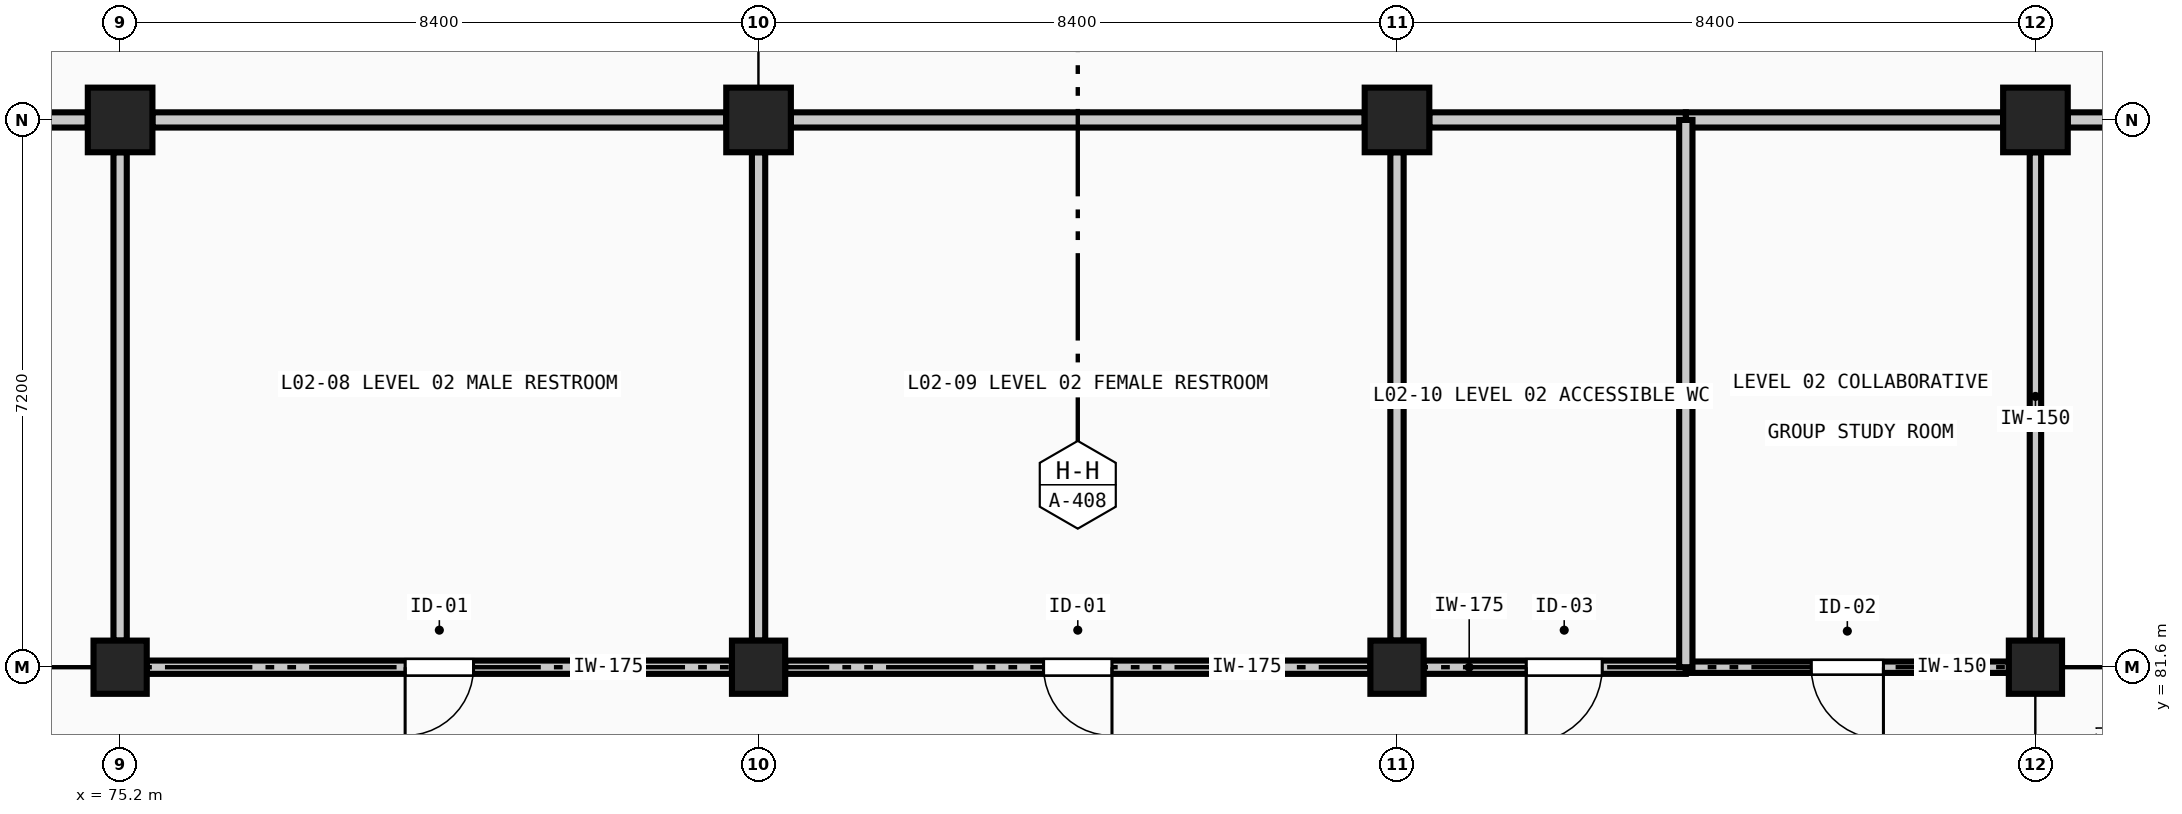
"""IFC4 building model, lengths in metres.
Left out: names, types, materials, properties, quantities, classifications, styles, units other than length and angle.
Written with IfcOpenShell. Run it as: python <this file> out.ifc"""

import sys

from ifc_helpers import new_model, si_unit, direction, frame, frame_2d, origin, origin_2d, place, context, subcontext, project, spatial, rectangle, extrude, element, fill, save


model = new_model("IFC4")
c1 = context("Model", 3, precision=1e-05, world=origin(), true_north=direction((0.0, 1.0)))
c2 = subcontext(c1, "Body", "Model", "MODEL_VIEW")
j1 = project(units=[si_unit("LENGTHUNIT", "METRE"), si_unit("PLANEANGLEUNIT", "RADIAN")], contexts=[c1])
p1 = place(None, origin())
s1 = spatial("IfcSite", under=j1, at=p1, CompositionType="ELEMENT")
p2 = place(p1, origin())
s2 = spatial("IfcBuilding", under=s1, at=p2, CompositionType="ELEMENT")
p3 = place(p2, frame((0.0, 0.0, 9.6)))
s3 = spatial("IfcBuildingStorey", under=s2, at=p3, CompositionType="ELEMENT", Elevation=9.6)
p4 = place(p3, frame((75.2, 81.6, 0.0), z_axis=(0.0, 0.0, 1.0), x_axis=(1.0, 0.0, 0.0)))
e1 = element("IfcColumn", 1, at=p4, inside=s3, PredefinedType="COLUMN", context=c2, shape_type="SweptSolid", body=[
    extrude(rectangle(XDim=0.7, YDim=0.7, at=origin_2d()), origin(), (0.0, 0.0, 1.0), 4.8),
])
p5 = place(p3, frame((75.2, 88.8, 0.0), z_axis=(0.0, 0.0, 1.0), x_axis=(1.0, 0.0, 0.0)))
e2 = element("IfcColumn", 2, at=p5, inside=s3, PredefinedType="COLUMN", context=c2, shape_type="SweptSolid", body=[
    extrude(rectangle(XDim=0.85, YDim=0.85, at=origin_2d()), origin(), (0.0, 0.0, 1.0), 4.8),
])
p6 = place(p3, frame((83.6, 81.6, 0.0), z_axis=(0.0, 0.0, 1.0), x_axis=(1.0, 0.0, 0.0)))
e3 = element("IfcColumn", 3, at=p6, inside=s3, PredefinedType="COLUMN", context=c2, shape_type="SweptSolid", body=[
    extrude(rectangle(XDim=0.7, YDim=0.7, at=origin_2d()), origin(), (0.0, 0.0, 1.0), 4.8),
])
p7 = place(p3, frame((83.6, 88.8, 0.0), z_axis=(0.0, 0.0, 1.0), x_axis=(1.0, 0.0, 0.0)))
e4 = element("IfcColumn", 4, at=p7, inside=s3, PredefinedType="COLUMN", context=c2, shape_type="SweptSolid", body=[
    extrude(rectangle(XDim=0.85, YDim=0.85, at=origin_2d()), origin(), (0.0, 0.0, 1.0), 4.8),
])
p8 = place(p3, frame((92.0, 81.6, 0.0), z_axis=(0.0, 0.0, 1.0), x_axis=(1.0, 0.0, 0.0)))
e5 = element("IfcColumn", 5, at=p8, inside=s3, PredefinedType="COLUMN", context=c2, shape_type="SweptSolid", body=[
    extrude(rectangle(XDim=0.7, YDim=0.7, at=origin_2d()), origin(), (0.0, 0.0, 1.0), 4.8),
])
p9 = place(p3, frame((92.0, 88.8, 0.0), z_axis=(0.0, 0.0, 1.0), x_axis=(1.0, 0.0, 0.0)))
e6 = element("IfcColumn", 6, at=p9, inside=s3, PredefinedType="COLUMN", context=c2, shape_type="SweptSolid", body=[
    extrude(rectangle(XDim=0.85, YDim=0.85, at=origin_2d()), origin(), (0.0, 0.0, 1.0), 4.8),
])
p10 = place(p3, frame((100.4, 81.6, 0.0), z_axis=(0.0, 0.0, 1.0), x_axis=(1.0, 0.0, 0.0)))
e7 = element("IfcColumn", 7, at=p10, inside=s3, PredefinedType="COLUMN", context=c2, shape_type="SweptSolid", body=[
    extrude(rectangle(XDim=0.7, YDim=0.7, at=origin_2d()), origin(), (0.0, 0.0, 1.0), 4.8),
])
p11 = place(p3, frame((100.4, 88.8, 0.0), z_axis=(0.0, 0.0, 1.0), x_axis=(1.0, 0.0, 0.0)))
e8 = element("IfcColumn", 8, at=p11, inside=s3, PredefinedType="COLUMN", context=c2, shape_type="SweptSolid", body=[
    extrude(rectangle(XDim=0.85, YDim=0.85, at=origin_2d()), origin(), (0.0, 0.0, 1.0), 4.8),
])
p12 = place(p3, frame((83.25, 81.6, 0.0), z_axis=(0.0, 0.0, 1.0), x_axis=(-1.0, 0.0, 0.0)))
e9 = element("IfcWall", 9, at=p12, inside=s3, PredefinedType="PLUMBINGWALL", context=c2, shape_type="SweptSolid", body=[
    extrude(rectangle(XDim=7.7, YDim=0.175, at=frame_2d((3.85, 0.0))), origin(), (0.0, 0.0, 1.0), 4.0),
])
p13 = place(p12, frame((3.4, 0.0, 0.0)))
e10 = element("IfcOpeningElement", 10, at=p13, cuts=e9, PredefinedType="OPENING", context=c2, shape_type="SweptSolid", body=[
    extrude(rectangle(XDim=0.9, YDim=2.1, at=frame_2d((0.45, 1.05))), frame((0.0, 0.097, 0.0), z_axis=(0.0, -1.0, 0.0), x_axis=(1.0, 0.0, 0.0)), (0.0, 0.0, 1.0), 0.195),
])
p14 = place(p3, frame((91.65, 81.6, 0.0), z_axis=(0.0, 0.0, 1.0), x_axis=(-1.0, 0.0, 0.0)))
e11 = element("IfcWall", 11, at=p14, inside=s3, PredefinedType="PLUMBINGWALL", context=c2, shape_type="SweptSolid", body=[
    extrude(rectangle(XDim=7.7, YDim=0.175, at=frame_2d((3.85, 0.0))), origin(), (0.0, 0.0, 1.0), 4.0),
])
p15 = place(p14, frame((3.4, 0.0, 0.0)))
e12 = element("IfcOpeningElement", 12, at=p15, cuts=e11, PredefinedType="OPENING", context=c2, shape_type="SweptSolid", body=[
    extrude(rectangle(XDim=0.9, YDim=2.1, at=frame_2d((0.45, 1.05))), frame((0.0, 0.097, 0.0), z_axis=(0.0, -1.0, 0.0), x_axis=(1.0, 0.0, 0.0)), (0.0, 0.0, 1.0), 0.195),
])
p16 = place(p3, frame((95.8, 81.6, 0.0), z_axis=(0.0, 0.0, 1.0), x_axis=(-1.0, 0.0, 0.0)))
e13 = element("IfcWall", 13, at=p16, inside=s3, PredefinedType="PLUMBINGWALL", context=c2, shape_type="SweptSolid", body=[
    extrude(rectangle(XDim=3.45, YDim=0.175, at=frame_2d((1.725, 0.0))), origin(), (0.0, 0.0, 1.0), 4.0),
])
p17 = place(p16, frame((1.1, 0.0, 0.0)))
e14 = element("IfcOpeningElement", 14, at=p17, cuts=e13, PredefinedType="OPENING", context=c2, shape_type="SweptSolid", body=[
    extrude(rectangle(XDim=1.0, YDim=2.15, at=frame_2d((0.5, 1.075))), frame((0.0, 0.097, 0.0), z_axis=(0.0, -1.0, 0.0), x_axis=(1.0, 0.0, 0.0)), (0.0, 0.0, 1.0), 0.195),
])
p18 = place(p3, frame((100.05, 81.6, 0.0), z_axis=(0.0, 0.0, 1.0), x_axis=(-1.0, 0.0, 0.0)))
e15 = element("IfcWall", 15, at=p18, inside=s3, PredefinedType="PARTITIONING", context=c2, shape_type="SweptSolid", body=[
    extrude(rectangle(XDim=4.25, YDim=0.15, at=frame_2d((2.125, 0.0))), origin(), (0.0, 0.0, 1.0), 4.0),
])
p19 = place(p18, frame((1.65, 0.0, 0.0)))
e16 = element("IfcOpeningElement", 16, at=p19, cuts=e15, PredefinedType="OPENING", context=c2, shape_type="SweptSolid", body=[
    extrude(rectangle(XDim=0.95, YDim=2.15, at=frame_2d((0.475, 1.075))), frame((0.0, 0.085, 0.0), z_axis=(0.0, -1.0, 0.0), x_axis=(1.0, 0.0, 0.0)), (0.0, 0.0, 1.0), 0.17),
])
p20 = place(p3, frame((108.375, 88.8, 0.0), z_axis=(0.0, 0.0, 1.0), x_axis=(-1.0, 0.0, 0.0)))
e17 = element("IfcWall", 17, at=p20, inside=s3, PredefinedType="PARTITIONING", context=c2, shape_type="SweptSolid", body=[
    extrude(rectangle(XDim=7.55, YDim=0.2, at=frame_2d((3.775, 0.0))), origin(), (0.0, 0.0, 1.0), 3.75),
])
p21 = place(p3, frame((99.975, 88.8, 0.0), z_axis=(0.0, 0.0, 1.0), x_axis=(-1.0, 0.0, 0.0)))
e18 = element("IfcWall", 18, at=p21, inside=s3, PredefinedType="PARTITIONING", context=c2, shape_type="SweptSolid", body=[
    extrude(rectangle(XDim=4.175, YDim=0.2, at=frame_2d((2.087, 0.0))), origin(), (0.0, 0.0, 1.0), 3.75),
])
p22 = place(p3, frame((95.8, 88.8, 0.0), z_axis=(0.0, 0.0, 1.0), x_axis=(-1.0, 0.0, 0.0)))
e19 = element("IfcWall", 19, at=p22, inside=s3, PredefinedType="PARTITIONING", context=c2, shape_type="SweptSolid", body=[
    extrude(rectangle(XDim=3.375, YDim=0.2, at=frame_2d((1.688, 0.0))), origin(), (0.0, 0.0, 1.0), 3.75),
])
for number, where, z_axis, x_axis in (
    (20, (91.575, 88.8, 0.0), (0.0, 0.0, 1.0), (-1.0, 0.0, 0.0)),
    (21, (83.175, 88.8, 0.0), (0.0, 0.0, 1.0), (-1.0, 0.0, 0.0)),
):
    element("IfcWall", number, at=place(p3, frame(where, z_axis=z_axis, x_axis=x_axis)), inside=s3, PredefinedType="PARTITIONING", context=c2, shape_type="SweptSolid", body=[
        extrude(rectangle(XDim=7.55, YDim=0.2, at=frame_2d((3.775, 0.0))), origin(), (0.0, 0.0, 1.0), 3.75),
    ])
p23 = place(p3, frame((74.775, 88.8, 0.0), z_axis=(0.0, 0.0, 1.0), x_axis=(-1.0, 0.0, 0.0)))
e22 = element("IfcWall", 22, at=p23, inside=s3, PredefinedType="PARTITIONING", context=c2, shape_type="SweptSolid", body=[
    extrude(rectangle(XDim=7.55, YDim=0.2, at=frame_2d((3.775, 0.0))), origin(), (0.0, 0.0, 1.0), 3.75),
])
for number, where, z_axis, x_axis in (
    (23, (75.2, 81.95, 0.0), (0.0, 0.0, 1.0), (0.0, 1.0, 0.0)),
    (24, (83.6, 88.375, 0.0), (0.0, 0.0, 1.0), (0.0, -1.0, 0.0)),
    (25, (92.0, 88.375, 0.0), (0.0, 0.0, 1.0), (0.0, -1.0, 0.0)),
):
    element("IfcWall", number, at=place(p3, frame(where, z_axis=z_axis, x_axis=x_axis)), inside=s3, PredefinedType="PLUMBINGWALL", context=c2, shape_type="SweptSolid", body=[
        extrude(rectangle(XDim=6.425, YDim=0.175, at=frame_2d((3.212, 0.0))), origin(), (0.0, 0.0, 1.0), 4.05),
    ])
p24 = place(p3, frame((95.8, 88.8, 0.0), z_axis=(0.0, 0.0, 1.0), x_axis=(0.0, -1.0, 0.0)))
e26 = element("IfcWall", 26, at=p24, inside=s3, PredefinedType="PLUMBINGWALL", context=c2, shape_type="SweptSolid", body=[
    extrude(rectangle(XDim=7.2, YDim=0.175, at=frame_2d((3.6, 0.0))), origin(), (0.0, 0.0, 1.0), 4.55),
])
p25 = place(p3, frame((100.4, 88.375, 0.0), z_axis=(0.0, 0.0, 1.0), x_axis=(0.0, -1.0, 0.0)))
e27 = element("IfcWall", 27, at=p25, inside=s3, PredefinedType="PARTITIONING", context=c2, shape_type="SweptSolid", body=[
    extrude(rectangle(XDim=6.425, YDim=0.15, at=frame_2d((3.212, 0.0))), origin(), (0.0, 0.0, 1.0), 4.05),
])
p26 = place(p13, origin())
e28 = element("IfcDoor", 28, at=p26, inside=s3, OperationType="SINGLE_SWING_RIGHT", PredefinedType="DOOR", context=c2, shape_type="SweptSolid", body=[
    extrude(rectangle(XDim=0.9, YDim=2.1, at=frame_2d((0.45, 1.05))), frame((0.0, 0.025, 0.0), z_axis=(0.0, -1.0, 0.0), x_axis=(1.0, 0.0, 0.0)), (0.0, 0.0, 1.0), 0.05),
])
fill(e10, e28)
p27 = place(p15, origin())
e29 = element("IfcDoor", 29, at=p27, inside=s3, OperationType="SINGLE_SWING_LEFT", PredefinedType="DOOR", context=c2, shape_type="SweptSolid", body=[
    extrude(rectangle(XDim=0.9, YDim=2.1, at=frame_2d((0.45, 1.05))), frame((0.0, 0.025, 0.0), z_axis=(0.0, -1.0, 0.0), x_axis=(1.0, 0.0, 0.0)), (0.0, 0.0, 1.0), 0.05),
])
fill(e12, e29)
p28 = place(p17, origin())
e30 = element("IfcDoor", 30, at=p28, inside=s3, OperationType="SINGLE_SWING_RIGHT", PredefinedType="DOOR", context=c2, shape_type="SweptSolid", body=[
    extrude(rectangle(XDim=1.0, YDim=2.15, at=frame_2d((0.5, 1.075))), frame((0.0, 0.025, 0.0), z_axis=(0.0, -1.0, 0.0), x_axis=(1.0, 0.0, 0.0)), (0.0, 0.0, 1.0), 0.05),
])
fill(e14, e30)
p29 = place(p19, origin())
e31 = element("IfcDoor", 31, at=p29, inside=s3, OperationType="SINGLE_SWING_LEFT", PredefinedType="DOOR", context=c2, shape_type="SweptSolid", body=[
    extrude(rectangle(XDim=0.95, YDim=2.15, at=frame_2d((0.475, 1.075))), frame((0.0, 0.025, 0.0), z_axis=(0.0, -1.0, 0.0), x_axis=(1.0, 0.0, 0.0)), (0.0, 0.0, 1.0), 0.05),
])
fill(e16, e31)
save(model, sys.argv[1])
